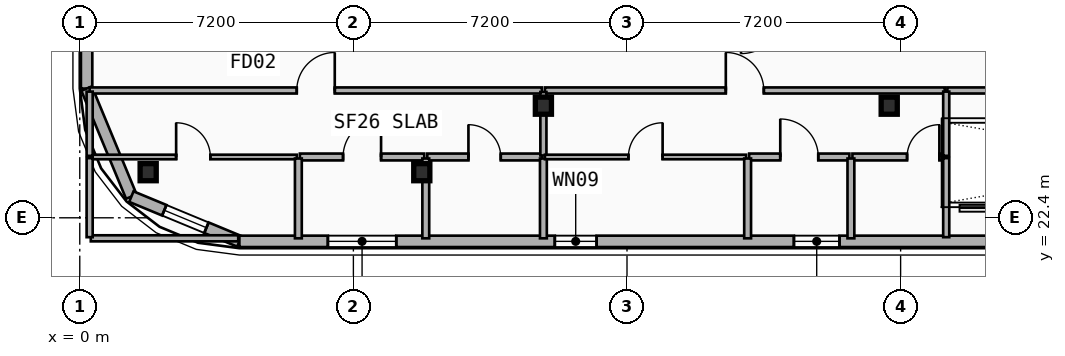
"""IFC4 building model, lengths in metres.
Left out: names, types, materials, properties, quantities, classifications, styles, units other than length and angle.
Written with IfcOpenShell. Run it as: python <this file> out.ifc"""

import sys

from ifc_helpers import new_model, si_unit, direction, frame, frame_2d, origin, origin_2d, place, context, subcontext, project, spatial, rectangle, i_section, extrude, element, fill, save


model = new_model("IFC4")
c1 = context("Model", 3, precision=1e-05, world=origin(), true_north=direction((0.0, 1.0)))
c2 = subcontext(c1, "Body", "Model", "MODEL_VIEW")
j1 = project(units=[si_unit("LENGTHUNIT", "METRE"), si_unit("PLANEANGLEUNIT", "RADIAN")], contexts=[c1])
p1 = place(None, origin())
s1 = spatial("IfcSite", under=j1, at=p1, CompositionType="ELEMENT")
p2 = place(p1, origin())
s2 = spatial("IfcBuilding", under=s1, at=p2, CompositionType="ELEMENT")
p3 = place(p2, frame((0.0, 0.0, 67.5)))
s3 = spatial("IfcBuildingStorey", under=s2, at=p3, CompositionType="ELEMENT", Elevation=67.5)
for number, where, z_axis, x_axis in (
    (1, (12.2, 25.35, 0.0), (0.0, 0.0, 1.0), (1.0, 0.0, 0.0)),
    (2, (21.3, 25.35, 0.0), (0.0, 0.0, 1.0), (1.0, 0.0, 0.0)),
    (3, (9.0, 23.6, 0.0), (0.0, 0.0, 1.0), (1.0, 0.0, 0.0)),
    (4, (1.8, 23.6, 0.0), (0.0, 0.0, 1.0), (1.0, 0.0, 0.0)),
):
    element("IfcColumn", number, at=place(p3, frame(where, z_axis=z_axis, x_axis=x_axis)), inside=s3, PredefinedType="COLUMN", context=c2, shape_type="SweptSolid", body=[
        extrude(i_section(OverallWidth=0.424, OverallDepth=0.45, WebThickness=0.041, FlangeThickness=0.065, FilletRadius=0.015, at=origin_2d()), origin(), (0.0, 0.0, 1.0), 3.5),
    ])
p4 = place(p3, frame((0.18, 25.8, 0.0), z_axis=(0.0, 0.0, 1.0), x_axis=(0.0, 1.0, 0.0)))
e5 = element("IfcWall", 5, at=p4, inside=s3, PredefinedType="SOLIDWALL", context=c2, shape_type="SweptSolid", body=[
    extrude(rectangle(XDim=15.2, YDim=0.3, at=frame_2d((7.6, 0.0))), origin(), (0.0, 0.0, 1.0), 3.24),
])
p5 = place(p4, frame((2.86, 0.0, 0.48)))
e6 = element("IfcOpeningElement", 6, at=p5, cuts=e5, PredefinedType="OPENING", context=c2, shape_type="SweptSolid", body=[
    extrude(rectangle(XDim=1.4, YDim=1.8, at=frame_2d((0.7, 0.9))), frame((0.0, 0.16, 0.0), z_axis=(0.0, -1.0, 0.0), x_axis=(1.0, 0.0, 0.0)), (0.0, 0.0, 1.0), 0.32),
])
p6 = place(p4, frame((5.019, 0.0, 0.48)))
e7 = element("IfcOpeningElement", 7, at=p6, cuts=e5, PredefinedType="OPENING", context=c2, shape_type="SweptSolid", body=[
    extrude(rectangle(XDim=1.4, YDim=1.8, at=frame_2d((0.7, 0.9))), frame((0.0, 0.16, 0.0), z_axis=(0.0, -1.0, 0.0), x_axis=(1.0, 0.0, 0.0)), (0.0, 0.0, 1.0), 0.32),
])
p7 = place(p4, frame((8.186, 0.0, 0.48)))
e8 = element("IfcOpeningElement", 8, at=p7, cuts=e5, PredefinedType="OPENING", context=c2, shape_type="SweptSolid", body=[
    extrude(rectangle(XDim=1.4, YDim=1.8, at=frame_2d((0.7, 0.9))), frame((0.0, 0.16, 0.0), z_axis=(0.0, -1.0, 0.0), x_axis=(1.0, 0.0, 0.0)), (0.0, 0.0, 1.0), 0.32),
])
p8 = place(p4, frame((9.993, 0.0, 0.48)))
e9 = element("IfcOpeningElement", 9, at=p8, cuts=e5, PredefinedType="OPENING", context=c2, shape_type="SweptSolid", body=[
    extrude(rectangle(XDim=1.4, YDim=1.8, at=frame_2d((0.7, 0.9))), frame((0.0, 0.16, 0.0), z_axis=(0.0, -1.0, 0.0), x_axis=(1.0, 0.0, 0.0)), (0.0, 0.0, 1.0), 0.32),
])
p9 = place(p3, frame((1.357, 22.958, 0.0), z_axis=(0.0, 0.0, 1.0), x_axis=(-0.382704529509, 0.923870793506, 0.0)))
e10 = element("IfcWall", 10, at=p9, inside=s3, PredefinedType="SOLIDWALL", context=c2, shape_type="SweptSolid", body=[
    extrude(rectangle(XDim=3.077, YDim=0.3, at=frame_2d((1.538, 0.0))), origin(), (0.0, 0.0, 1.0), 3.24),
])
p10 = place(p3, frame((4.2, 21.78, 0.0), z_axis=(0.0, 0.0, 1.0), x_axis=(-0.923870793506, 0.382704529509, 0.0)))
e11 = element("IfcWall", 11, at=p10, inside=s3, PredefinedType="SOLIDWALL", context=c2, shape_type="SweptSolid", body=[
    extrude(rectangle(XDim=3.077, YDim=0.3, at=frame_2d((1.538, 0.0))), origin(), (0.0, 0.0, 1.0), 2.72),
])
p11 = place(p10, frame((0.938, 0.0, 0.75)))
e12 = element("IfcOpeningElement", 12, at=p11, cuts=e11, PredefinedType="OPENING", context=c2, shape_type="SweptSolid", body=[
    extrude(rectangle(XDim=1.2, YDim=1.5, at=frame_2d((0.6, 0.75))), frame((0.0, 0.16, 0.0), z_axis=(0.0, -1.0, 0.0), x_axis=(1.0, 0.0, 0.0)), (0.0, 0.0, 1.0), 0.32),
])
p12 = place(p3, frame((53.4, 21.78, 0.0), z_axis=(0.0, 0.0, 1.0), x_axis=(-1.0, 0.0, 0.0)))
e13 = element("IfcWall", 13, at=p12, inside=s3, PredefinedType="SOLIDWALL", context=c2, shape_type="SweptSolid", body=[
    extrude(rectangle(XDim=49.2, YDim=0.3, at=frame_2d((24.6, 0.0))), origin(), (0.0, 0.0, 1.0), 2.72),
])
p13 = place(p12, frame((45.072, 0.0, 0.48)))
e14 = element("IfcOpeningElement", 14, at=p13, cuts=e13, PredefinedType="OPENING", context=c2, shape_type="SweptSolid", body=[
    extrude(rectangle(XDim=1.8, YDim=1.8, at=frame_2d((0.9, 0.9))), frame((0.0, 0.16, 0.0), z_axis=(0.0, -1.0, 0.0), x_axis=(1.0, 0.0, 0.0)), (0.0, 0.0, 1.0), 0.32),
])
p14 = place(p12, frame((39.8, 0.0, 1.05)))
e15 = element("IfcOpeningElement", 15, at=p14, cuts=e13, PredefinedType="OPENING", context=c2, shape_type="SweptSolid", body=[
    extrude(rectangle(XDim=1.1, YDim=1.05, at=frame_2d((0.55, 0.525))), frame((0.0, 0.16, 0.0), z_axis=(0.0, -1.0, 0.0), x_axis=(1.0, 0.0, 0.0)), (0.0, 0.0, 1.0), 0.32),
])
p15 = place(p12, frame((33.408, 0.0, 0.34)))
e16 = element("IfcOpeningElement", 16, at=p15, cuts=e13, PredefinedType="OPENING", context=c2, shape_type="SweptSolid", body=[
    extrude(rectangle(XDim=1.2, YDim=1.5, at=frame_2d((0.6, 0.75))), frame((0.0, 0.16, 0.0), z_axis=(0.0, -1.0, 0.0), x_axis=(1.0, 0.0, 0.0)), (0.0, 0.0, 1.0), 0.32),
])
p16 = place(p12, frame((17.1, 0.0, 0.68)))
e17 = element("IfcOpeningElement", 17, at=p16, cuts=e13, PredefinedType="OPENING", context=c2, shape_type="SweptSolid", body=[
    extrude(rectangle(XDim=1.2, YDim=1.5, at=frame_2d((0.6, 0.75))), frame((0.0, 0.16, 0.0), z_axis=(0.0, -1.0, 0.0), x_axis=(1.0, 0.0, 0.0)), (0.0, 0.0, 1.0), 0.32),
])
p17 = place(p12, frame((10.808, 0.0, 0.34)))
e18 = element("IfcOpeningElement", 18, at=p17, cuts=e13, PredefinedType="OPENING", context=c2, shape_type="SweptSolid", body=[
    extrude(rectangle(XDim=1.1, YDim=1.05, at=frame_2d((0.55, 0.525))), frame((0.0, 0.16, 0.0), z_axis=(0.0, -1.0, 0.0), x_axis=(1.0, 0.0, 0.0)), (0.0, 0.0, 1.0), 0.32),
])
p18 = place(p12, frame((4.354, 0.0, 0.74)))
e19 = element("IfcOpeningElement", 19, at=p18, cuts=e13, PredefinedType="OPENING", context=c2, shape_type="SweptSolid", body=[
    extrude(rectangle(XDim=1.8, YDim=1.8, at=frame_2d((0.9, 0.9))), frame((0.0, 0.16, 0.0), z_axis=(0.0, -1.0, 0.0), x_axis=(1.0, 0.0, 0.0)), (0.0, 0.0, 1.0), 0.32),
])
p19 = place(p12, frame((0.364, 0.0, 0.74)))
e20 = element("IfcOpeningElement", 20, at=p19, cuts=e13, PredefinedType="OPENING", context=c2, shape_type="SweptSolid", body=[
    extrude(rectangle(XDim=1.8, YDim=1.8, at=frame_2d((0.9, 0.9))), frame((0.0, 0.16, 0.0), z_axis=(0.0, -1.0, 0.0), x_axis=(1.0, 0.0, 0.0)), (0.0, 0.0, 1.0), 0.32),
])
p20 = place(p3, frame((0.26, 25.75, 0.0), z_axis=(0.0, 0.0, 1.0), x_axis=(1.0, 0.0, 0.0)))
e21 = element("IfcWall", 21, at=p20, inside=s3, PredefinedType="PARTITIONING", context=c2, shape_type="SweptSolid", body=[
    extrude(rectangle(XDim=11.9, YDim=0.16, at=frame_2d((5.95, 0.0))), origin(), (0.0, 0.0, 1.0), 2.31),
])
p21 = place(p20, frame((5.45, 0.0, 0.0)))
e22 = element("IfcOpeningElement", 22, at=p21, cuts=e21, PredefinedType="OPENING", context=c2, shape_type="SweptSolid", body=[
    extrude(rectangle(XDim=1.0, YDim=2.15, at=frame_2d((0.5, 1.075))), frame((0.0, 0.09, 0.0), z_axis=(0.0, -1.0, 0.0), x_axis=(1.0, 0.0, 0.0)), (0.0, 0.0, 1.0), 0.18),
])
p22 = place(p3, frame((12.24, 25.75, 0.0), z_axis=(0.0, 0.0, 1.0), x_axis=(1.0, 0.0, 0.0)))
e23 = element("IfcWall", 23, at=p22, inside=s3, PredefinedType="PARTITIONING", context=c2, shape_type="SweptSolid", body=[
    extrude(rectangle(XDim=10.52, YDim=0.16, at=frame_2d((5.26, 0.0))), origin(), (0.0, 0.0, 1.0), 2.31),
])
p23 = place(p22, frame((4.76, 0.0, 0.0)))
e24 = element("IfcOpeningElement", 24, at=p23, cuts=e23, PredefinedType="OPENING", context=c2, shape_type="SweptSolid", body=[
    extrude(rectangle(XDim=1.0, YDim=2.15, at=frame_2d((0.5, 1.075))), frame((0.0, 0.09, 0.0), z_axis=(0.0, -1.0, 0.0), x_axis=(1.0, 0.0, 0.0)), (0.0, 0.0, 1.0), 0.18),
])
p24 = place(p3, frame((0.26, 24.0, 0.0), z_axis=(0.0, 0.0, 1.0), x_axis=(1.0, 0.0, 0.0)))
e25 = element("IfcWall", 25, at=p24, inside=s3, PredefinedType="PARTITIONING", context=c2, shape_type="SweptSolid", body=[
    extrude(rectangle(XDim=5.452, YDim=0.12, at=frame_2d((2.726, 0.0))), origin(), (0.0, 0.0, 1.0), 2.57),
])
p25 = place(p24, frame((2.276, 0.0, 0.0)))
e26 = element("IfcOpeningElement", 26, at=p25, cuts=e25, PredefinedType="OPENING", context=c2, shape_type="SweptSolid", body=[
    extrude(rectangle(XDim=0.9, YDim=2.1, at=frame_2d((0.45, 1.05))), frame((0.0, 0.07, 0.0), z_axis=(0.0, -1.0, 0.0), x_axis=(1.0, 0.0, 0.0)), (0.0, 0.0, 1.0), 0.14),
])
p26 = place(p3, frame((5.792, 24.0, 0.0), z_axis=(0.0, 0.0, 1.0), x_axis=(1.0, 0.0, 0.0)))
e27 = element("IfcWall", 27, at=p26, inside=s3, PredefinedType="PLUMBINGWALL", context=c2, shape_type="SweptSolid", body=[
    extrude(rectangle(XDim=3.273, YDim=0.18, at=frame_2d((1.636, 0.0))), origin(), (0.0, 0.0, 1.0), 2.57),
])
p27 = place(p26, frame((1.136, 0.0, 0.0)))
e28 = element("IfcOpeningElement", 28, at=p27, cuts=e27, PredefinedType="OPENING", context=c2, shape_type="SweptSolid", body=[
    extrude(rectangle(XDim=1.0, YDim=2.15, at=frame_2d((0.5, 1.075))), frame((0.0, 0.1, 0.0), z_axis=(0.0, -1.0, 0.0), x_axis=(1.0, 0.0, 0.0)), (0.0, 0.0, 1.0), 0.2),
])
p28 = place(p3, frame((9.145, 24.0, 0.0), z_axis=(0.0, 0.0, 1.0), x_axis=(1.0, 0.0, 0.0)))
e29 = element("IfcWall", 29, at=p28, inside=s3, PredefinedType="PLUMBINGWALL", context=c2, shape_type="SweptSolid", body=[
    extrude(rectangle(XDim=3.015, YDim=0.18, at=frame_2d((1.507, 0.0))), origin(), (0.0, 0.0, 1.0), 2.31),
])
p29 = place(p28, frame((1.083, 0.0, 0.0)))
e30 = element("IfcOpeningElement", 30, at=p29, cuts=e29, PredefinedType="OPENING", context=c2, shape_type="SweptSolid", body=[
    extrude(rectangle(XDim=0.85, YDim=2.1, at=frame_2d((0.425, 1.05))), frame((0.0, 0.1, 0.0), z_axis=(0.0, -1.0, 0.0), x_axis=(1.0, 0.0, 0.0)), (0.0, 0.0, 1.0), 0.2),
])
p30 = place(p3, frame((12.2, 24.04, 0.0), z_axis=(0.0, 0.0, 1.0), x_axis=(0.0, 1.0, 0.0)))
e31 = element("IfcWall", 31, at=p30, inside=s3, PredefinedType="PARTITIONING", context=c2, shape_type="SweptSolid", body=[
    extrude(rectangle(XDim=1.67, YDim=0.16, at=frame_2d((0.835, 0.0))), origin(), (0.0, 0.0, 1.0), 2.31),
])
for number, where, z_axis, x_axis in (
    (32, (5.752, 21.86, 0.0), (0.0, 0.0, 1.0), (0.0, 1.0, 0.0)),
    (33, (9.105, 21.86, 0.0), (0.0, 0.0, 1.0), (0.0, 1.0, 0.0)),
):
    element("IfcWall", number, at=place(p3, frame(where, z_axis=z_axis, x_axis=x_axis)), inside=s3, PredefinedType="PLUMBINGWALL", context=c2, shape_type="SweptSolid", body=[
        extrude(rectangle(XDim=2.1, YDim=0.18, at=frame_2d((1.05, 0.0))), origin(), (0.0, 0.0, 1.0), 2.72),
    ])
p31 = place(p3, frame((12.2, 21.86, 0.0), z_axis=(0.0, 0.0, 1.0), x_axis=(0.0, 1.0, 0.0)))
e34 = element("IfcWall", 34, at=p31, inside=s3, PredefinedType="PLUMBINGWALL", context=c2, shape_type="SweptSolid", body=[
    extrude(rectangle(XDim=2.1, YDim=0.18, at=frame_2d((1.05, 0.0))), origin(), (0.0, 0.0, 1.0), 2.31),
])
p32 = place(p3, frame((12.24, 24.0, 0.0), z_axis=(0.0, 0.0, 1.0), x_axis=(1.0, 0.0, 0.0)))
e35 = element("IfcWall", 35, at=p32, inside=s3, PredefinedType="PARTITIONING", context=c2, shape_type="SweptSolid", body=[
    extrude(rectangle(XDim=5.294, YDim=0.12, at=frame_2d((2.647, 0.0))), origin(), (0.0, 0.0, 1.0), 2.31),
])
p33 = place(p32, frame((2.197, 0.0, 0.0)))
e36 = element("IfcOpeningElement", 36, at=p33, cuts=e35, PredefinedType="OPENING", context=c2, shape_type="SweptSolid", body=[
    extrude(rectangle(XDim=0.9, YDim=2.1, at=frame_2d((0.45, 1.05))), frame((0.0, 0.07, 0.0), z_axis=(0.0, -1.0, 0.0), x_axis=(1.0, 0.0, 0.0)), (0.0, 0.0, 1.0), 0.14),
])
p34 = place(p3, frame((17.614, 24.0, 0.0), z_axis=(0.0, 0.0, 1.0), x_axis=(1.0, 0.0, 0.0)))
e37 = element("IfcWall", 37, at=p34, inside=s3, PredefinedType="PLUMBINGWALL", context=c2, shape_type="SweptSolid", body=[
    extrude(rectangle(XDim=2.638, YDim=0.18, at=frame_2d((1.319, 0.0))), origin(), (0.0, 0.0, 1.0), 3.24),
])
p35 = place(p34, frame((0.819, 0.0, 0.0)))
e38 = element("IfcOpeningElement", 38, at=p35, cuts=e37, PredefinedType="OPENING", context=c2, shape_type="SweptSolid", body=[
    extrude(rectangle(XDim=1.0, YDim=2.15, at=frame_2d((0.5, 1.075))), frame((0.0, 0.1, 0.0), z_axis=(0.0, -1.0, 0.0), x_axis=(1.0, 0.0, 0.0)), (0.0, 0.0, 1.0), 0.2),
])
p36 = place(p3, frame((20.332, 24.0, 0.0), z_axis=(0.0, 0.0, 1.0), x_axis=(1.0, 0.0, 0.0)))
e39 = element("IfcWall", 39, at=p36, inside=s3, PredefinedType="PLUMBINGWALL", context=c2, shape_type="SweptSolid", body=[
    extrude(rectangle(XDim=2.428, YDim=0.18, at=frame_2d((1.214, 0.0))), origin(), (0.0, 0.0, 1.0), 2.31),
])
p37 = place(p36, frame((1.438, 0.0, 0.0)))
e40 = element("IfcOpeningElement", 40, at=p37, cuts=e39, PredefinedType="OPENING", context=c2, shape_type="SweptSolid", body=[
    extrude(rectangle(XDim=0.85, YDim=2.1, at=frame_2d((0.425, 1.05))), frame((0.0, 0.1, 0.0), z_axis=(0.0, -1.0, 0.0), x_axis=(1.0, 0.0, 0.0)), (0.0, 0.0, 1.0), 0.2),
])
for number, where, z_axis, x_axis in (
    (41, (17.574, 21.86, 0.0), (0.0, 0.0, 1.0), (0.0, 1.0, 0.0)),
    (42, (20.292, 21.86, 0.0), (0.0, 0.0, 1.0), (0.0, 1.0, 0.0)),
):
    element("IfcWall", number, at=place(p3, frame(where, z_axis=z_axis, x_axis=x_axis)), inside=s3, PredefinedType="PLUMBINGWALL", context=c2, shape_type="SweptSolid", body=[
        extrude(rectangle(XDim=2.1, YDim=0.18, at=frame_2d((1.05, 0.0))), origin(), (0.0, 0.0, 1.0), 2.73),
    ])
p38 = place(p3, frame((22.83, 25.75, 0.0), z_axis=(0.0, 0.0, 1.0), x_axis=(1.0, 0.0, 0.0)))
e43 = element("IfcWall", 43, at=p38, inside=s3, PredefinedType="PARTITIONING", context=c2, shape_type="SweptSolid", body=[
    extrude(rectangle(XDim=11.94, YDim=0.16, at=frame_2d((5.97, 0.0))), origin(), (0.0, 0.0, 1.0), 3.24),
])
p39 = place(p3, frame((0.26, 24.03, 0.0), z_axis=(0.0, 0.0, 1.0), x_axis=(0.0, 1.0, 0.0)))
e44 = element("IfcWall", 44, at=p39, inside=s3, PredefinedType="PARTITIONING", context=c2, shape_type="SweptSolid", body=[
    extrude(rectangle(XDim=1.69, YDim=0.16, at=frame_2d((0.845, 0.0))), origin(), (0.0, 0.0, 1.0), 3.24),
])
p40 = place(p3, frame((0.29, 21.86, 0.0), z_axis=(0.0, 0.0, 1.0), x_axis=(1.0, 0.0, 0.0)))
e45 = element("IfcWall", 45, at=p40, inside=s3, PredefinedType="PARTITIONING", context=c2, shape_type="SweptSolid", body=[
    extrude(rectangle(XDim=3.88, YDim=0.16, at=frame_2d((1.94, 0.0))), origin(), (0.0, 0.0, 1.0), 2.72),
])
p41 = place(p3, frame((0.26, 21.89, 0.0), z_axis=(0.0, 0.0, 1.0), x_axis=(0.0, 1.0, 0.0)))
e46 = element("IfcWall", 46, at=p41, inside=s3, PredefinedType="PARTITIONING", context=c2, shape_type="SweptSolid", body=[
    extrude(rectangle(XDim=2.08, YDim=0.16, at=frame_2d((1.04, 0.0))), origin(), (0.0, 0.0, 1.0), 3.24),
])
p42 = place(p3, frame((22.8, 24.03, 0.0), z_axis=(0.0, 0.0, 1.0), x_axis=(0.0, 1.0, 0.0)))
e47 = element("IfcWall", 47, at=p42, inside=s3, PredefinedType="PARTITIONING", context=c2, shape_type="SweptSolid", body=[
    extrude(rectangle(XDim=1.69, YDim=0.16, at=frame_2d((0.845, 0.0))), origin(), (0.0, 0.0, 1.0), 3.24),
])
p43 = place(p3, frame((22.8, 21.89, 0.0), z_axis=(0.0, 0.0, 1.0), x_axis=(0.0, 1.0, 0.0)))
e48 = element("IfcWall", 48, at=p43, inside=s3, PredefinedType="PARTITIONING", context=c2, shape_type="SweptSolid", body=[
    extrude(rectangle(XDim=2.08, YDim=0.16, at=frame_2d((1.04, 0.0))), origin(), (0.0, 0.0, 1.0), 2.68),
])
p44 = place(p13, origin())
e49 = element("IfcWindow", 49, at=p44, inside=s3, PartitioningType="SINGLE_PANEL", PredefinedType="WINDOW", context=c2, shape_type="SweptSolid", body=[
    extrude(rectangle(XDim=1.8, YDim=1.8, at=frame_2d((0.9, 0.9))), frame((0.0, 0.03, 0.0), z_axis=(0.0, -1.0, 0.0), x_axis=(1.0, 0.0, 0.0)), (0.0, 0.0, 1.0), 0.06),
])
fill(e14, e49)
p45 = place(p14, origin())
e50 = element("IfcWindow", 50, at=p45, inside=s3, PartitioningType="SINGLE_PANEL", PredefinedType="WINDOW", context=c2, shape_type="SweptSolid", body=[
    extrude(rectangle(XDim=1.1, YDim=1.05, at=frame_2d((0.55, 0.525))), frame((0.0, 0.03, 0.0), z_axis=(0.0, -1.0, 0.0), x_axis=(1.0, 0.0, 0.0)), (0.0, 0.0, 1.0), 0.06),
])
fill(e15, e50)
p46 = place(p15, origin())
e51 = element("IfcWindow", 51, at=p46, inside=s3, PartitioningType="SINGLE_PANEL", PredefinedType="WINDOW", context=c2, shape_type="SweptSolid", body=[
    extrude(rectangle(XDim=1.2, YDim=1.5, at=frame_2d((0.6, 0.75))), frame((0.0, 0.03, 0.0), z_axis=(0.0, -1.0, 0.0), x_axis=(1.0, 0.0, 0.0)), (0.0, 0.0, 1.0), 0.06),
])
fill(e16, e51)
p47 = place(p11, origin())
e52 = element("IfcWindow", 52, at=p47, inside=s3, PartitioningType="SINGLE_PANEL", PredefinedType="WINDOW", context=c2, shape_type="SweptSolid", body=[
    extrude(rectangle(XDim=1.2, YDim=1.5, at=frame_2d((0.6, 0.75))), frame((0.0, 0.03, 0.0), z_axis=(0.0, -1.0, 0.0), x_axis=(1.0, 0.0, 0.0)), (0.0, 0.0, 1.0), 0.06),
])
fill(e12, e52)
p48 = place(p21, origin())
e53 = element("IfcDoor", 53, at=p48, inside=s3, OperationType="SINGLE_SWING_RIGHT", PredefinedType="DOOR", context=c2, shape_type="SweptSolid", body=[
    extrude(rectangle(XDim=1.0, YDim=2.15, at=frame_2d((0.5, 1.075))), frame((0.0, 0.025, 0.0), z_axis=(0.0, -1.0, 0.0), x_axis=(1.0, 0.0, 0.0)), (0.0, 0.0, 1.0), 0.05),
])
fill(e22, e53)
p49 = place(p23, origin())
e54 = element("IfcDoor", 54, at=p49, inside=s3, OperationType="SINGLE_SWING_LEFT", PredefinedType="DOOR", context=c2, shape_type="SweptSolid", body=[
    extrude(rectangle(XDim=1.0, YDim=2.15, at=frame_2d((0.5, 1.075))), frame((0.0, 0.025, 0.0), z_axis=(0.0, -1.0, 0.0), x_axis=(1.0, 0.0, 0.0)), (0.0, 0.0, 1.0), 0.05),
])
fill(e24, e54)
p50 = place(p25, origin())
e55 = element("IfcDoor", 55, at=p50, inside=s3, OperationType="SINGLE_SWING_LEFT", PredefinedType="DOOR", context=c2, shape_type="SweptSolid", body=[
    extrude(rectangle(XDim=0.9, YDim=2.1, at=frame_2d((0.45, 1.05))), frame((0.0, 0.025, 0.0), z_axis=(0.0, -1.0, 0.0), x_axis=(1.0, 0.0, 0.0)), (0.0, 0.0, 1.0), 0.05),
])
fill(e26, e55)
p51 = place(p27, origin())
e56 = element("IfcDoor", 56, at=p51, inside=s3, OperationType="SINGLE_SWING_RIGHT", PredefinedType="DOOR", context=c2, shape_type="SweptSolid", body=[
    extrude(rectangle(XDim=1.0, YDim=2.15, at=frame_2d((0.5, 1.075))), frame((0.0, 0.025, 0.0), z_axis=(0.0, -1.0, 0.0), x_axis=(1.0, 0.0, 0.0)), (0.0, 0.0, 1.0), 0.05),
])
fill(e28, e56)
p52 = place(p29, origin())
e57 = element("IfcDoor", 57, at=p52, inside=s3, OperationType="SINGLE_SWING_LEFT", PredefinedType="DOOR", context=c2, shape_type="SweptSolid", body=[
    extrude(rectangle(XDim=0.85, YDim=2.1, at=frame_2d((0.425, 1.05))), frame((0.0, 0.025, 0.0), z_axis=(0.0, -1.0, 0.0), x_axis=(1.0, 0.0, 0.0)), (0.0, 0.0, 1.0), 0.05),
])
fill(e30, e57)
p53 = place(p33, origin())
e58 = element("IfcDoor", 58, at=p53, inside=s3, OperationType="SINGLE_SWING_RIGHT", PredefinedType="DOOR", context=c2, shape_type="SweptSolid", body=[
    extrude(rectangle(XDim=0.9, YDim=2.1, at=frame_2d((0.45, 1.05))), frame((0.0, 0.025, 0.0), z_axis=(0.0, -1.0, 0.0), x_axis=(1.0, 0.0, 0.0)), (0.0, 0.0, 1.0), 0.05),
])
fill(e36, e58)
p54 = place(p35, origin())
e59 = element("IfcDoor", 59, at=p54, inside=s3, OperationType="SINGLE_SWING_LEFT", PredefinedType="DOOR", context=c2, shape_type="SweptSolid", body=[
    extrude(rectangle(XDim=1.0, YDim=2.15, at=frame_2d((0.5, 1.075))), frame((0.0, 0.025, 0.0), z_axis=(0.0, -1.0, 0.0), x_axis=(1.0, 0.0, 0.0)), (0.0, 0.0, 1.0), 0.05),
])
fill(e38, e59)
p55 = place(p37, origin())
e60 = element("IfcDoor", 60, at=p55, inside=s3, OperationType="SINGLE_SWING_RIGHT", PredefinedType="DOOR", context=c2, shape_type="SweptSolid", body=[
    extrude(rectangle(XDim=0.85, YDim=2.1, at=frame_2d((0.425, 1.05))), frame((0.0, 0.025, 0.0), z_axis=(0.0, -1.0, 0.0), x_axis=(1.0, 0.0, 0.0)), (0.0, 0.0, 1.0), 0.05),
])
fill(e40, e60)
save(model, sys.argv[1])
